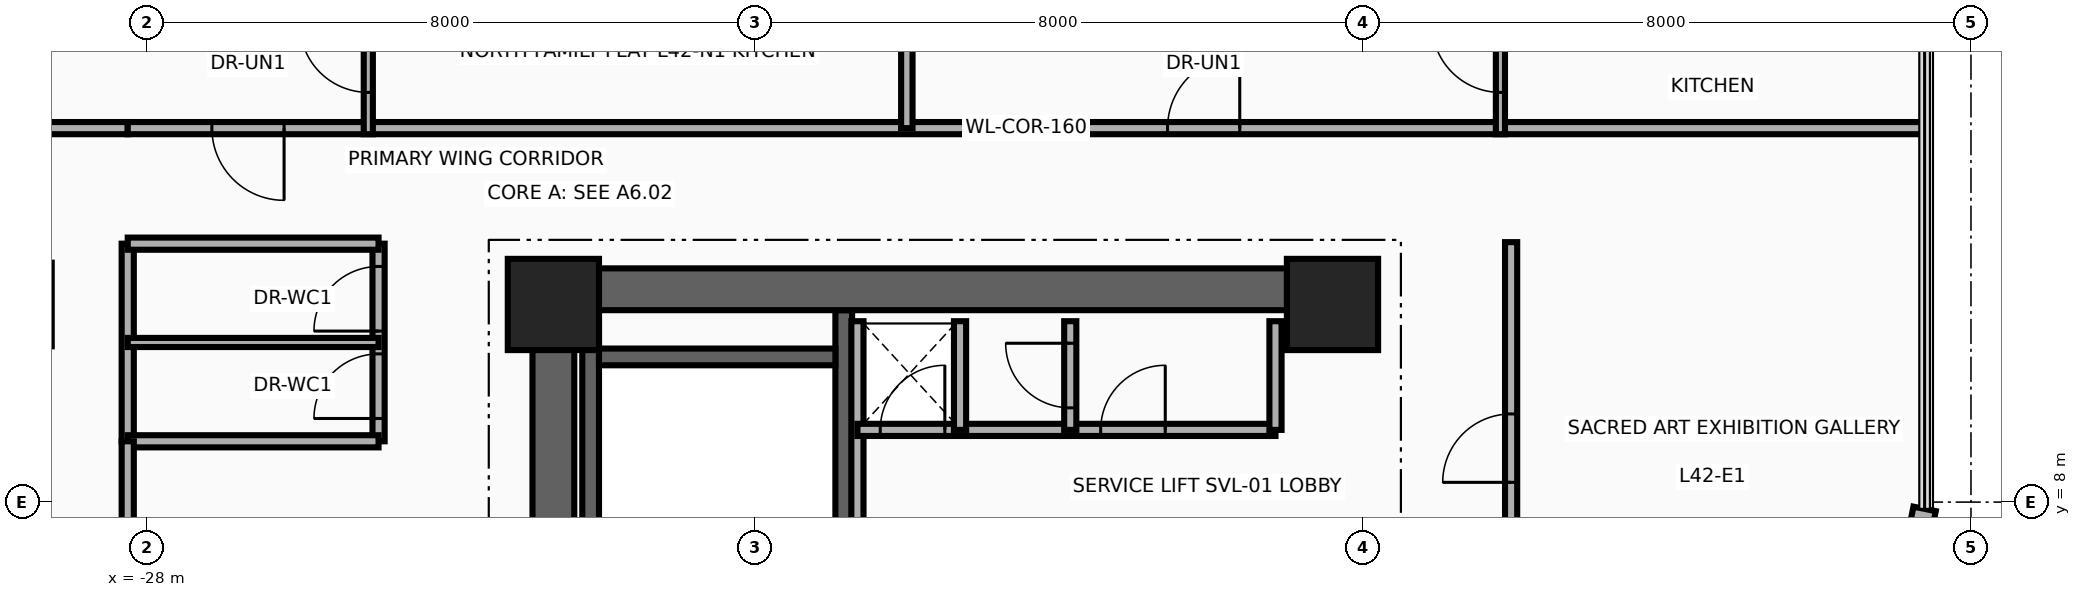
"""IFC4 building model, lengths in metres.
Left out: names, types, materials, properties, quantities, classifications, styles, units other than length and angle.
Written with IfcOpenShell. Run it as: python <this file> out.ifc"""

import sys

from ifc_helpers import new_model, si_unit, direction, frame, frame_2d, origin, origin_2d, place, context, subcontext, project, spatial, rectangle, extrude, source, transform, mapped, element, fill, save


model = new_model("IFC4")
c1 = context("Model", 3, precision=1e-05, world=origin(), true_north=direction((0.0, 1.0)))
c2 = subcontext(c1, "Body", "Model", "MODEL_VIEW")
j1 = project(units=[si_unit("LENGTHUNIT", "METRE"), si_unit("PLANEANGLEUNIT", "RADIAN")], contexts=[c1])
p1 = place(None, origin())
s1 = spatial("IfcSite", under=j1, at=p1, CompositionType="ELEMENT")
p2 = place(p1, origin())
s2 = spatial("IfcBuilding", under=s1, at=p2, CompositionType="ELEMENT")
p3 = place(p2, frame((0.0, 0.0, 164.9)))
s3 = spatial("IfcBuildingStorey", under=s2, at=p3, CompositionType="ELEMENT", Elevation=164.9)
for number, where, z_axis, x_axis in (
    (1, (-22.16, 1.78, 0.0), (0.0, 0.0, 1.0), (0.0, 1.0, 0.0)),
    (2, (-18.83, 1.78, 0.0), (0.0, 0.0, 1.0), (0.0, 1.0, 0.0)),
):
    element("IfcWall", number, at=place(p3, frame(where, z_axis=z_axis, x_axis=x_axis)), inside=s3, PredefinedType="SHEAR", context=c2, shape_type="SweptSolid", body=[
        extrude(rectangle(XDim=8.745, YDim=0.22, at=frame_2d((4.373, 0.0))), origin(), (0.0, 0.0, 1.0), 3.46),
    ])
p4 = place(p3, frame((-22.05, 9.91, 0.0), z_axis=(0.0, 0.0, 1.0), x_axis=(1.0, 0.0, 0.0)))
e3 = element("IfcWall", 3, at=p4, inside=s3, PredefinedType="SHEAR", context=c2, shape_type="SweptSolid", body=[
    extrude(rectangle(XDim=3.11, YDim=0.22, at=frame_2d((1.555, 0.0))), origin(), (0.0, 0.0, 1.0), 3.46),
])
p5 = place(p3, frame((-22.65, -11.075, 0.0), z_axis=(0.0, 0.0, 1.0), x_axis=(0.0, 1.0, 0.0)))
e4 = element("IfcWall", 4, at=p5, inside=s3, PredefinedType="SHEAR", context=c2, shape_type="SweptSolid", body=[
    extrude(rectangle(XDim=22.15, YDim=0.55, at=frame_2d((11.075, 0.0))), origin(), (0.0, 0.0, 1.0), 3.46),
])
p6 = place(p3, frame((-22.65, 10.8, 0.0), z_axis=(0.0, 0.0, 1.0), x_axis=(1.0, 0.0, 0.0)))
e5 = element("IfcWall", 5, at=p6, inside=s3, PredefinedType="SHEAR", context=c2, shape_type="SweptSolid", body=[
    extrude(rectangle(XDim=10.25, YDim=0.55, at=frame_2d((5.125, 0.0))), origin(), (0.0, 0.0, 1.0), 3.46),
])
m1 = source(origin(), c2, "Body", "SweptSolid", [
    extrude(rectangle(XDim=1.2, YDim=1.2, at=origin_2d()), origin(), (0.0, 0.0, 1.0), 3.7),
])
for number, where, z_axis, x_axis in (
    (6, (-22.65, 10.6, 0.0), (0.0, 0.0, 1.0), (1.0, 0.0, 0.0)),
    (7, (-12.4, 10.6, 0.0), (0.0, 0.0, 1.0), (1.0, 0.0, 0.0)),
):
    element("IfcColumn", number, at=place(p3, frame(where, z_axis=z_axis, x_axis=x_axis)), inside=s3, PredefinedType="COLUMN", context=c2, shape_type="MappedRepresentation", body=[
        mapped(m1, transform((0.0, 0.0, 0.0), x_axis=(1.0, 0.0, 0.0), y_axis=(0.0, 1.0, 0.0), z_axis=(0.0, 0.0, 1.0), scale=1.0)),
    ])
p7 = place(p3, frame((-4.61, 7.911, 0.0), z_axis=(0.0, 0.0, 1.0), x_axis=(-0.194989739953, -0.980805282058, 0.0)))
e8 = element("IfcWall", 8, at=p7, inside=s3, PredefinedType="SOLIDWALL", context=c2, shape_type="SweptSolid", body=[
    extrude(rectangle(XDim=0.709, YDim=0.3, at=frame_2d((0.354, 0.0))), origin(), (0.0, 0.0, 1.0), 3.46),
])
p8 = place(p3, frame((-18.65, 7.45, 0.0), z_axis=(0.0, 0.0, 1.0), x_axis=(0.0, 1.0, 0.0)))
e9 = element("IfcWall", 9, at=p8, inside=s3, PredefinedType="PARTITIONING", context=c2, shape_type="SweptSolid", body=[
    extrude(rectangle(XDim=2.93, YDim=0.16, at=frame_2d((1.465, 0.0))), origin(), (0.0, 0.0, 1.0), 3.46),
])
p9 = place(p3, frame((-18.65, 8.95, 0.0), z_axis=(0.0, 0.0, 1.0), x_axis=(1.0, 0.0, 0.0)))
e10 = element("IfcWall", 10, at=p9, inside=s3, PredefinedType="PARTITIONING", context=c2, shape_type="SweptSolid", body=[
    extrude(rectangle(XDim=5.5, YDim=0.16, at=frame_2d((2.75, 0.0))), origin(), (0.0, 0.0, 1.0), 3.46),
])
p10 = place(p9, frame((0.3, 0.0, 0.0)))
e11 = element("IfcOpeningElement", 11, at=p10, cuts=e10, PredefinedType="OPENING", context=c2, shape_type="SweptSolid", body=[
    extrude(rectangle(XDim=0.85, YDim=2.05, at=frame_2d((0.425, 1.025))), frame((0.0, 0.095, 0.0), z_axis=(0.0, -1.0, 0.0), x_axis=(1.0, 0.0, 0.0)), (0.0, 0.0, 1.0), 0.19),
])
p11 = place(p9, frame((3.2, 0.0, 0.0)))
e12 = element("IfcOpeningElement", 12, at=p11, cuts=e10, PredefinedType="OPENING", context=c2, shape_type="SweptSolid", body=[
    extrude(rectangle(XDim=0.85, YDim=2.05, at=frame_2d((0.425, 1.025))), frame((0.0, 0.095, 0.0), z_axis=(0.0, -1.0, 0.0), x_axis=(1.0, 0.0, 0.0)), (0.0, 0.0, 1.0), 0.19),
])
for number, where, z_axis, x_axis in (
    (13, (-13.15, 8.95, 0.0), (0.0, 0.0, 1.0), (0.0, 1.0, 0.0)),
    (14, (-17.3, 8.95, 0.0), (0.0, 0.0, 1.0), (0.0, 1.0, 0.0)),
):
    element("IfcWall", number, at=place(p3, frame(where, z_axis=z_axis, x_axis=x_axis)), inside=s3, PredefinedType="PARTITIONING", context=c2, shape_type="SweptSolid", body=[
        extrude(rectangle(XDim=1.43, YDim=0.16, at=frame_2d((0.715, 0.0))), origin(), (0.0, 0.0, 1.0), 3.46),
    ])
p12 = place(p3, frame((-15.85, 8.95, 0.0), z_axis=(0.0, 0.0, 1.0), x_axis=(0.0, 1.0, 0.0)))
e15 = element("IfcWall", 15, at=p12, inside=s3, PredefinedType="PARTITIONING", context=c2, shape_type="SweptSolid", body=[
    extrude(rectangle(XDim=1.43, YDim=0.16, at=frame_2d((0.715, 0.0))), origin(), (0.0, 0.0, 1.0), 3.46),
])
p13 = place(p12, frame((0.29, 0.0, 0.0)))
e16 = element("IfcOpeningElement", 16, at=p13, cuts=e15, PredefinedType="OPENING", context=c2, shape_type="SweptSolid", body=[
    extrude(rectangle(XDim=0.85, YDim=2.05, at=frame_2d((0.425, 1.025))), frame((0.0, 0.095, 0.0), z_axis=(0.0, -1.0, 0.0), x_axis=(1.0, 0.0, 0.0)), (0.0, 0.0, 1.0), 0.19),
])
p14 = place(p3, frame((-28.25, 8.8, 0.0), z_axis=(0.0, 0.0, 1.0), x_axis=(0.0, 1.0, 0.0)))
e17 = element("IfcWall", 17, at=p14, inside=s3, PredefinedType="PARTITIONING", context=c2, shape_type="SweptSolid", body=[
    extrude(rectangle(XDim=2.6, YDim=0.16, at=frame_2d((1.3, 0.0))), origin(), (0.0, 0.0, 1.0), 2.666),
])
p15 = place(p3, frame((-24.95, 8.8, 0.0), z_axis=(0.0, 0.0, 1.0), x_axis=(0.0, 1.0, 0.0)))
e18 = element("IfcWall", 18, at=p15, inside=s3, PredefinedType="PARTITIONING", context=c2, shape_type="SweptSolid", body=[
    extrude(rectangle(XDim=2.6, YDim=0.16, at=frame_2d((1.3, 0.0))), origin(), (0.0, 0.0, 1.0), 2.666),
])
p16 = place(p15, frame((0.3, 0.0, 0.0)))
e19 = element("IfcOpeningElement", 19, at=p16, cuts=e18, PredefinedType="OPENING", context=c2, shape_type="SweptSolid", body=[
    extrude(rectangle(XDim=0.85, YDim=2.1, at=frame_2d((0.425, 1.05))), frame((0.0, 0.095, 0.0), z_axis=(0.0, -1.0, 0.0), x_axis=(1.0, 0.0, 0.0)), (0.0, 0.0, 1.0), 0.19),
])
p17 = place(p15, frame((1.45, 0.0, 0.0)))
e20 = element("IfcOpeningElement", 20, at=p17, cuts=e18, PredefinedType="OPENING", context=c2, shape_type="SweptSolid", body=[
    extrude(rectangle(XDim=0.85, YDim=2.1, at=frame_2d((0.425, 1.05))), frame((0.0, 0.095, 0.0), z_axis=(0.0, -1.0, 0.0), x_axis=(1.0, 0.0, 0.0)), (0.0, 0.0, 1.0), 0.19),
])
for number, where, z_axis, x_axis in (
    (21, (-28.25, 8.8, 0.0), (0.0, 0.0, 1.0), (1.0, 0.0, 0.0)),
    (22, (-28.25, 11.4, 0.0), (0.0, 0.0, 1.0), (1.0, 0.0, 0.0)),
):
    element("IfcWall", number, at=place(p3, frame(where, z_axis=z_axis, x_axis=x_axis)), inside=s3, PredefinedType="PARTITIONING", context=c2, shape_type="SweptSolid", body=[
        extrude(rectangle(XDim=3.3, YDim=0.16, at=frame_2d((1.65, 0.0))), origin(), (0.0, 0.0, 1.0), 3.46),
    ])
p18 = place(p3, frame((-28.25, 10.1, 0.0), z_axis=(0.0, 0.0, 1.0), x_axis=(1.0, 0.0, 0.0)))
e23 = element("IfcWall", 23, at=p18, inside=s3, PredefinedType="PARTITIONING", context=c2, shape_type="SweptSolid", body=[
    extrude(rectangle(XDim=3.3, YDim=0.12, at=frame_2d((1.65, 0.0))), origin(), (0.0, 0.0, 1.0), 3.46),
])
p19 = place(p3, frame((-28.25, 5.8, 0.0), z_axis=(0.0, 0.0, 1.0), x_axis=(0.0, 1.0, 0.0)))
e24 = element("IfcWall", 24, at=p19, inside=s3, PredefinedType="PARTITIONING", context=c2, shape_type="SweptSolid", body=[
    extrude(rectangle(XDim=3.0, YDim=0.16, at=frame_2d((1.5, 0.0))), origin(), (0.0, 0.0, 1.0), 2.988),
])
p20 = place(p3, frame((-30.89, 12.92, 0.0), z_axis=(0.0, 0.0, 1.0), x_axis=(1.0, 0.0, 0.0)))
e25 = element("IfcWall", 25, at=p20, inside=s3, PredefinedType="PARTITIONING", context=c2, shape_type="SweptSolid", body=[
    extrude(rectangle(XDim=2.64, YDim=0.16, at=frame_2d((1.32, 0.0))), origin(), (0.0, 0.0, 1.0), 2.896),
])
p21 = place(p3, frame((-28.25, 12.92, 0.0), z_axis=(0.0, 0.0, 1.0), x_axis=(1.0, 0.0, 0.0)))
e26 = element("IfcWall", 26, at=p21, inside=s3, PredefinedType="PARTITIONING", context=c2, shape_type="SweptSolid", body=[
    extrude(rectangle(XDim=23.64, YDim=0.16, at=frame_2d((11.82, 0.0))), origin(), (0.0, 0.0, 1.0), 2.834),
])
p22 = place(p21, frame((1.107, 0.0, 0.0)))
e27 = element("IfcOpeningElement", 27, at=p22, cuts=e26, PredefinedType="OPENING", context=c2, shape_type="SweptSolid", body=[
    extrude(rectangle(XDim=0.95, YDim=2.15, at=frame_2d((0.475, 1.075))), frame((0.0, 0.095, 0.0), z_axis=(0.0, -1.0, 0.0), x_axis=(1.0, 0.0, 0.0)), (0.0, 0.0, 1.0), 0.19),
])
p23 = place(p21, frame((13.68, 0.0, 0.0)))
e28 = element("IfcOpeningElement", 28, at=p23, cuts=e26, PredefinedType="OPENING", context=c2, shape_type="SweptSolid", body=[
    extrude(rectangle(XDim=0.95, YDim=2.15, at=frame_2d((0.475, 1.075))), frame((0.0, 0.095, 0.0), z_axis=(0.0, -1.0, 0.0), x_axis=(1.0, 0.0, 0.0)), (0.0, 0.0, 1.0), 0.19),
])
p24 = place(p3, frame((-18.0, 12.92, 0.0), z_axis=(0.0, 0.0, 1.0), x_axis=(0.0, 1.0, 0.0)))
e29 = element("IfcWall", 29, at=p24, inside=s3, PredefinedType="PARTITIONING", context=c2, shape_type="SweptSolid", body=[
    extrude(rectangle(XDim=6.457, YDim=0.15, at=frame_2d((3.229, 0.0))), origin(), (0.0, 0.0, 1.0), 2.666),
])
p25 = place(p3, frame((-25.085, 12.84, 0.0), z_axis=(0.0, 0.0, 1.0), x_axis=(0.0, 1.0, 0.0)))
e30 = element("IfcWall", 30, at=p25, inside=s3, PredefinedType="PARTITIONING", context=c2, shape_type="SweptSolid", body=[
    extrude(rectangle(XDim=2.08, YDim=0.12, at=frame_2d((1.04, 0.0))), origin(), (0.0, 0.0, 1.0), 2.666),
])
p26 = place(p25, frame((0.55, 0.0, 0.0)))
e31 = element("IfcOpeningElement", 31, at=p26, cuts=e30, PredefinedType="OPENING", context=c2, shape_type="SweptSolid", body=[
    extrude(rectangle(XDim=0.9, YDim=2.1, at=frame_2d((0.45, 1.05))), frame((0.0, 0.075, 0.0), z_axis=(0.0, -1.0, 0.0), x_axis=(1.0, 0.0, 0.0)), (0.0, 0.0, 1.0), 0.15),
])
p27 = place(p3, frame((-10.191, 12.84, 0.0), z_axis=(0.0, 0.0, 1.0), x_axis=(0.0, 1.0, 0.0)))
e32 = element("IfcWall", 32, at=p27, inside=s3, PredefinedType="PARTITIONING", context=c2, shape_type="SweptSolid", body=[
    extrude(rectangle(XDim=2.08, YDim=0.12, at=frame_2d((1.04, 0.0))), origin(), (0.0, 0.0, 1.0), 3.46),
])
p28 = place(p27, frame((0.55, 0.0, 0.0)))
e33 = element("IfcOpeningElement", 33, at=p28, cuts=e32, PredefinedType="OPENING", context=c2, shape_type="SweptSolid", body=[
    extrude(rectangle(XDim=0.9, YDim=2.1, at=frame_2d((0.45, 1.05))), frame((0.0, 0.075, 0.0), z_axis=(0.0, -1.0, 0.0), x_axis=(1.0, 0.0, 0.0)), (0.0, 0.0, 1.0), 0.15),
])
p29 = place(p3, frame((-10.05, 6.0, 0.0), z_axis=(0.0, 0.0, 1.0), x_axis=(0.0, 1.0, 0.0)))
e34 = element("IfcWall", 34, at=p29, inside=s3, PredefinedType="PARTITIONING", context=c2, shape_type="SweptSolid", body=[
    extrude(rectangle(XDim=5.42, YDim=0.16, at=frame_2d((2.71, 0.0))), origin(), (0.0, 0.0, 1.0), 3.46),
])
p30 = place(p29, frame((2.26, 0.0, 0.0)))
e35 = element("IfcOpeningElement", 35, at=p30, cuts=e34, PredefinedType="OPENING", context=c2, shape_type="SweptSolid", body=[
    extrude(rectangle(XDim=0.9, YDim=2.1, at=frame_2d((0.45, 1.05))), frame((0.0, 0.095, 0.0), z_axis=(0.0, -1.0, 0.0), x_axis=(1.0, 0.0, 0.0)), (0.0, 0.0, 1.0), 0.19),
])
p31 = place(p10, origin())
e36 = element("IfcDoor", 36, at=p31, inside=s3, OperationType="SINGLE_SWING_LEFT", PredefinedType="DOOR", context=c2, shape_type="SweptSolid", body=[
    extrude(rectangle(XDim=0.85, YDim=2.05, at=frame_2d((0.425, 1.025))), frame((0.0, 0.025, 0.0), z_axis=(0.0, -1.0, 0.0), x_axis=(1.0, 0.0, 0.0)), (0.0, 0.0, 1.0), 0.05),
])
fill(e11, e36)
p32 = place(p11, origin())
e37 = element("IfcDoor", 37, at=p32, inside=s3, OperationType="SINGLE_SWING_RIGHT", PredefinedType="DOOR", context=c2, shape_type="SweptSolid", body=[
    extrude(rectangle(XDim=0.85, YDim=2.05, at=frame_2d((0.425, 1.025))), frame((0.0, 0.025, 0.0), z_axis=(0.0, -1.0, 0.0), x_axis=(1.0, 0.0, 0.0)), (0.0, 0.0, 1.0), 0.05),
])
fill(e12, e37)
p33 = place(p13, origin())
e38 = element("IfcDoor", 38, at=p33, inside=s3, OperationType="SINGLE_SWING_LEFT", PredefinedType="DOOR", context=c2, shape_type="SweptSolid", body=[
    extrude(rectangle(XDim=0.85, YDim=2.05, at=frame_2d((0.425, 1.025))), frame((0.0, 0.025, 0.0), z_axis=(0.0, -1.0, 0.0), x_axis=(1.0, 0.0, 0.0)), (0.0, 0.0, 1.0), 0.05),
])
fill(e16, e38)
p34 = place(p16, origin())
e39 = element("IfcDoor", 39, at=p34, inside=s3, OperationType="SINGLE_SWING_LEFT", PredefinedType="DOOR", context=c2, shape_type="SweptSolid", body=[
    extrude(rectangle(XDim=0.85, YDim=2.1, at=frame_2d((0.425, 1.05))), frame((0.0, 0.025, 0.0), z_axis=(0.0, -1.0, 0.0), x_axis=(1.0, 0.0, 0.0)), (0.0, 0.0, 1.0), 0.05),
])
fill(e19, e39)
p35 = place(p17, origin())
e40 = element("IfcDoor", 40, at=p35, inside=s3, OperationType="SINGLE_SWING_RIGHT", PredefinedType="DOOR", context=c2, shape_type="SweptSolid", body=[
    extrude(rectangle(XDim=0.85, YDim=2.1, at=frame_2d((0.425, 1.05))), frame((0.0, 0.025, 0.0), z_axis=(0.0, -1.0, 0.0), x_axis=(1.0, 0.0, 0.0)), (0.0, 0.0, 1.0), 0.05),
])
fill(e20, e40)
p36 = place(p22, frame((0.95, 0.0, 0.0), z_axis=(0.0, 0.0, 1.0), x_axis=(-1.0, 0.0, 0.0)))
e41 = element("IfcDoor", 41, at=p36, inside=s3, OperationType="SINGLE_SWING_LEFT", PredefinedType="DOOR", context=c2, shape_type="SweptSolid", body=[
    extrude(rectangle(XDim=0.95, YDim=2.15, at=frame_2d((0.475, 1.075))), frame((0.0, 0.025, 0.0), z_axis=(0.0, -1.0, 0.0), x_axis=(1.0, 0.0, 0.0)), (0.0, 0.0, 1.0), 0.05),
])
fill(e27, e41)
p37 = place(p26, origin())
e42 = element("IfcDoor", 42, at=p37, inside=s3, OperationType="SINGLE_SWING_LEFT", PredefinedType="DOOR", context=c2, shape_type="SweptSolid", body=[
    extrude(rectangle(XDim=0.9, YDim=2.1, at=frame_2d((0.45, 1.05))), frame((0.0, 0.025, 0.0), z_axis=(0.0, -1.0, 0.0), x_axis=(1.0, 0.0, 0.0)), (0.0, 0.0, 1.0), 0.05),
])
fill(e31, e42)
p38 = place(p23, origin())
e43 = element("IfcDoor", 43, at=p38, inside=s3, OperationType="SINGLE_SWING_RIGHT", PredefinedType="DOOR", context=c2, shape_type="SweptSolid", body=[
    extrude(rectangle(XDim=0.95, YDim=2.15, at=frame_2d((0.475, 1.075))), frame((0.0, 0.025, 0.0), z_axis=(0.0, -1.0, 0.0), x_axis=(1.0, 0.0, 0.0)), (0.0, 0.0, 1.0), 0.05),
])
fill(e28, e43)
p39 = place(p28, origin())
e44 = element("IfcDoor", 44, at=p39, inside=s3, OperationType="SINGLE_SWING_RIGHT", PredefinedType="DOOR", context=c2, shape_type="SweptSolid", body=[
    extrude(rectangle(XDim=0.9, YDim=2.1, at=frame_2d((0.45, 1.05))), frame((0.0, 0.025, 0.0), z_axis=(0.0, -1.0, 0.0), x_axis=(1.0, 0.0, 0.0)), (0.0, 0.0, 1.0), 0.05),
])
fill(e33, e44)
p40 = place(p30, origin())
e45 = element("IfcDoor", 45, at=p40, inside=s3, OperationType="SINGLE_SWING_RIGHT", PredefinedType="DOOR", context=c2, shape_type="SweptSolid", body=[
    extrude(rectangle(XDim=0.9, YDim=2.1, at=frame_2d((0.45, 1.05))), frame((0.0, 0.025, 0.0), z_axis=(0.0, -1.0, 0.0), x_axis=(1.0, 0.0, 0.0)), (0.0, 0.0, 1.0), 0.05),
])
fill(e35, e45)
save(model, sys.argv[1])
